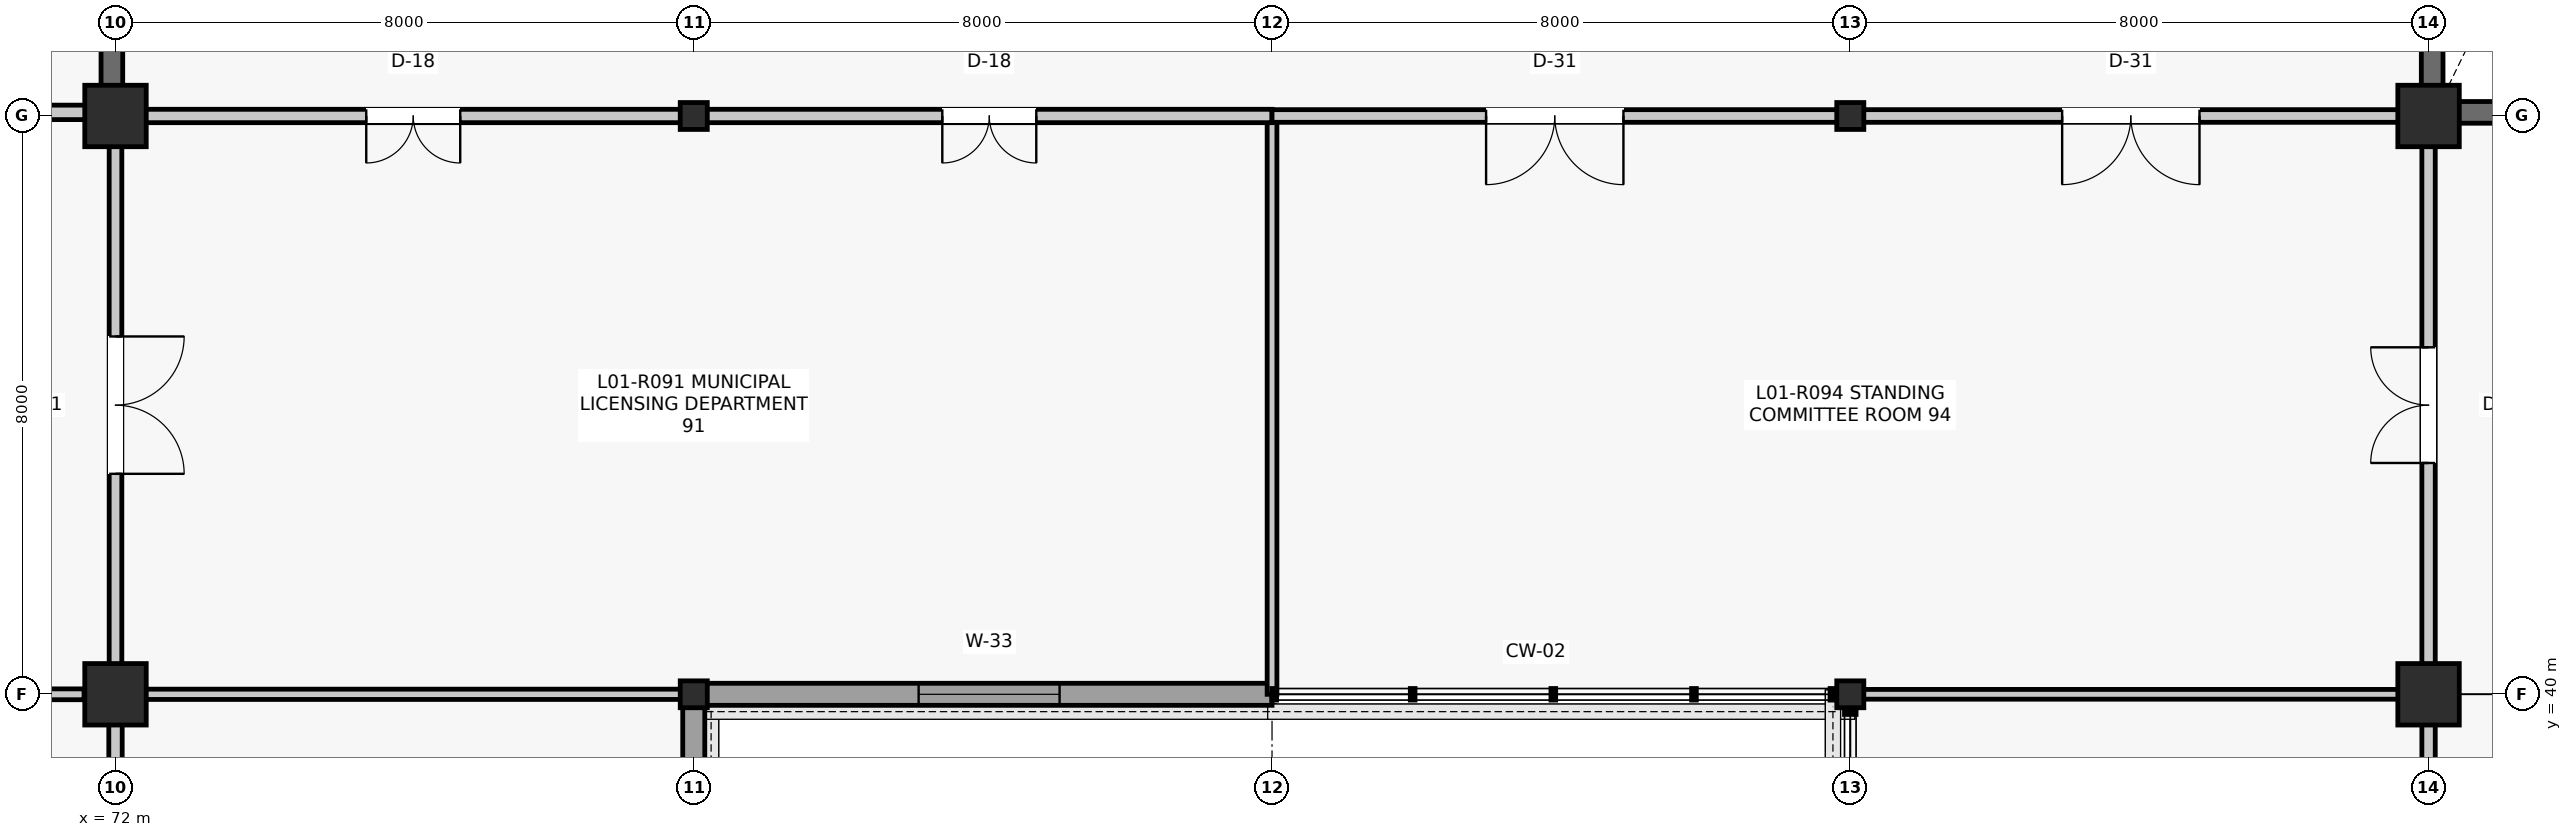
"""IFC4 building model, lengths in metres.
Left out: names, types, materials, properties, quantities, classifications, styles, units other than length and angle.
Written with IfcOpenShell. Run it as: python <this file> out.ifc"""

import sys

from ifc_helpers import new_model, si_unit, direction, frame, frame_2d, origin, origin_2d, place, context, subcontext, project, spatial, rectangle, i_section, extrude, element, fill, save


model = new_model("IFC4")
c1 = context("Model", 3, precision=1e-05, world=origin(), true_north=direction((0.0, 1.0)))
c2 = subcontext(c1, "Body", "Model", "MODEL_VIEW")
j1 = project(units=[si_unit("LENGTHUNIT", "METRE"), si_unit("PLANEANGLEUNIT", "RADIAN")], contexts=[c1])
p1 = place(None, origin())
s1 = spatial("IfcSite", under=j1, at=p1, CompositionType="ELEMENT")
p2 = place(p1, origin())
s2 = spatial("IfcBuilding", under=s1, at=p2, CompositionType="ELEMENT")
p3 = place(p2, frame((0.0, 0.0, 5.28)))
s3 = spatial("IfcBuildingStorey", under=s2, at=p3, CompositionType="ELEMENT", Elevation=5.28)
for number, where, z_axis, x_axis in (
    (1, (72.0, 40.0, 0.0), (0.0, 0.0, 1.0), (1.0, 0.0, 0.0)),
    (2, (72.0, 48.0, 0.0), (0.0, 0.0, 1.0), (1.0, 0.0, 0.0)),
):
    element("IfcColumn", number, at=place(p3, frame(where, z_axis=z_axis, x_axis=x_axis)), inside=s3, PredefinedType="COLUMN", context=c2, shape_type="SweptSolid", body=[
        extrude(rectangle(XDim=0.85, YDim=0.85, at=origin_2d()), origin(), (0.0, 0.0, 1.0), 4.62),
    ])
for number, where, z_axis, x_axis in (
    (3, (80.0, 40.0, 0.0), (0.0, 0.0, 1.0), (1.0, 0.0, 0.0)),
    (4, (80.0, 48.0, 0.0), (0.0, 0.0, 1.0), (1.0, 0.0, 0.0)),
    (5, (96.0, 40.0, 0.0), (0.0, 0.0, 1.0), (1.0, 0.0, 0.0)),
    (6, (96.0, 48.0, 0.0), (0.0, 0.0, 1.0), (1.0, 0.0, 0.0)),
):
    element("IfcColumn", number, at=place(p3, frame(where, z_axis=z_axis, x_axis=x_axis)), inside=s3, PredefinedType="COLUMN", context=c2, shape_type="SweptSolid", body=[
        extrude(i_section(OverallWidth=0.374, OverallDepth=0.372, WebThickness=0.016, FlangeThickness=0.026, FilletRadius=0.015, at=origin_2d()), origin(), (0.0, 0.0, 1.0), 4.62),
    ])
for number, where, z_axis, x_axis in (
    (7, (104.0, 40.0, 0.0), (0.0, 0.0, 1.0), (1.0, 0.0, 0.0)),
    (8, (104.0, 48.0, 0.0), (0.0, 0.0, 1.0), (1.0, 0.0, 0.0)),
):
    element("IfcColumn", number, at=place(p3, frame(where, z_axis=z_axis, x_axis=x_axis)), inside=s3, PredefinedType="COLUMN", context=c2, shape_type="SweptSolid", body=[
        extrude(rectangle(XDim=0.85, YDim=0.85, at=origin_2d()), origin(), (0.0, 0.0, 1.0), 4.62),
    ])
p4 = place(p3, frame((80.0, 32.171, 0.0), z_axis=(0.0, 0.0, 1.0), x_axis=(0.0, 1.0, 0.0)))
e9 = element("IfcWall", 9, at=p4, inside=s3, PredefinedType="SOLIDWALL", context=c2, shape_type="SweptSolid", body=[
    extrude(rectangle(XDim=7.658, YDim=0.305, at=frame_2d((3.829, 0.0))), origin(), (0.0, 0.0, 1.0), 3.788),
])
p5 = place(p4, frame((2.779, 0.0, 0.9)))
e10 = element("IfcOpeningElement", 10, at=p5, cuts=e9, PredefinedType="OPENING", context=c2, shape_type="SweptSolid", body=[
    extrude(rectangle(XDim=2.1, YDim=2.4, at=frame_2d((1.05, 1.2))), frame((0.0, 0.162, 0.0), z_axis=(0.0, -1.0, 0.0), x_axis=(1.0, 0.0, 0.0)), (0.0, 0.0, 1.0), 0.325),
])
p6 = place(p3, frame((80.172, 40.0, 0.0), z_axis=(0.0, 0.0, 1.0), x_axis=(1.0, 0.0, 0.0)))
e11 = element("IfcWall", 11, at=p6, inside=s3, PredefinedType="SOLIDWALL", context=c2, shape_type="SweptSolid", body=[
    extrude(rectangle(XDim=7.828, YDim=0.305, at=frame_2d((3.914, 0.0))), origin(), (0.0, 0.0, 1.0), 3.404),
])
p7 = place(p6, frame((2.939, 0.0, 0.9)))
e12 = element("IfcOpeningElement", 12, at=p7, cuts=e11, PredefinedType="OPENING", context=c2, shape_type="SweptSolid", body=[
    extrude(rectangle(XDim=1.95, YDim=2.304, at=frame_2d((0.975, 1.152))), frame((0.0, 0.162, 0.0), z_axis=(0.0, -1.0, 0.0), x_axis=(1.0, 0.0, 0.0)), (0.0, 0.0, 1.0), 0.325),
])
p8 = place(p3, frame((71.95, 48.315, 0.0), z_axis=(0.0, 0.0, 1.0), x_axis=(0.0, 1.0, 0.0)))
e13 = element("IfcWall", 13, at=p8, inside=s3, PredefinedType="SHEAR", context=c2, shape_type="SweptSolid", body=[
    extrude(rectangle(XDim=7.37, YDim=0.3, at=frame_2d((3.685, 0.0))), origin(), (0.0, 0.0, 1.0), 4.335),
])
p9 = place(p3, frame((68.0, 48.05, 0.0), z_axis=(0.0, 0.0, 1.0), x_axis=(1.0, 0.0, 0.0)))
e14 = element("IfcWall", 14, at=p9, inside=s3, PredefinedType="PARTITIONING", context=c2, shape_type="SweptSolid", body=[
    extrude(rectangle(XDim=3.585, YDim=0.2, at=frame_2d((1.792, 0.0))), origin(), (0.0, 0.0, 1.0), 3.771),
])
p10 = place(p9, frame((1.192, 0.0, 0.0)))
e15 = element("IfcOpeningElement", 15, at=p10, cuts=e14, PredefinedType="OPENING", context=c2, shape_type="SweptSolid", body=[
    extrude(rectangle(XDim=1.2, YDim=2.15, at=frame_2d((0.6, 1.075))), frame((0.0, 0.11, 0.0), z_axis=(0.0, -1.0, 0.0), x_axis=(1.0, 0.0, 0.0)), (0.0, 0.0, 1.0), 0.22),
])
p11 = place(p3, frame((104.05, 48.315, 0.0), z_axis=(0.0, 0.0, 1.0), x_axis=(0.0, 1.0, 0.0)))
e16 = element("IfcWall", 16, at=p11, inside=s3, PredefinedType="SHEAR", context=c2, shape_type="SweptSolid", body=[
    extrude(rectangle(XDim=7.37, YDim=0.3, at=frame_2d((3.685, 0.0))), origin(), (0.0, 0.0, 1.0), 4.335),
])
p12 = place(p3, frame((104.315, 48.05, 0.0), z_axis=(0.0, 0.0, 1.0), x_axis=(1.0, 0.0, 0.0)))
e17 = element("IfcWall", 17, at=p12, inside=s3, PredefinedType="SHEAR", context=c2, shape_type="SweptSolid", body=[
    extrude(rectangle(XDim=3.835, YDim=0.3, at=frame_2d((1.917, 0.0))), origin(), (0.0, 0.0, 1.0), 4.335),
])
p13 = place(p3, frame((66.75, 40.0, 0.0), z_axis=(0.0, 0.0, 1.0), x_axis=(1.0, 0.0, 0.0)))
e18 = element("IfcWall", 18, at=p13, inside=s3, PredefinedType="PARTITIONING", context=c2, shape_type="SweptSolid", body=[
    extrude(rectangle(XDim=4.815, YDim=0.15, at=frame_2d((2.407, 0.0))), origin(), (0.0, 0.0, 1.0), 3.787),
])
p14 = place(p3, frame((72.0, 32.415, 0.0), z_axis=(0.0, 0.0, 1.0), x_axis=(0.0, 1.0, 0.0)))
e19 = element("IfcWall", 19, at=p14, inside=s3, PredefinedType="PARTITIONING", context=c2, shape_type="SweptSolid", body=[
    extrude(rectangle(XDim=7.17, YDim=0.185, at=frame_2d((3.585, 0.0))), origin(), (0.0, 0.0, 1.0), 3.857),
])
p15 = place(p14, frame((0.52, 0.0, 0.0)))
e20 = element("IfcOpeningElement", 20, at=p15, cuts=e19, PredefinedType="OPENING", context=c2, shape_type="SweptSolid", body=[
    extrude(rectangle(XDim=0.94, YDim=2.12, at=frame_2d((0.47, 1.06))), frame((0.0, 0.103, 0.0), z_axis=(0.0, -1.0, 0.0), x_axis=(1.0, 0.0, 0.0)), (0.0, 0.0, 1.0), 0.205),
])
p16 = place(p3, frame((72.0, 40.415, 0.0), z_axis=(0.0, 0.0, 1.0), x_axis=(0.0, 1.0, 0.0)))
e21 = element("IfcWall", 21, at=p16, inside=s3, PredefinedType="PARTITIONING", context=c2, shape_type="SweptSolid", body=[
    extrude(rectangle(XDim=7.17, YDim=0.175, at=frame_2d((3.585, 0.0))), origin(), (0.0, 0.0, 1.0), 3.781),
])
p17 = place(p16, frame((2.635, 0.0, 0.0)))
e22 = element("IfcOpeningElement", 22, at=p17, cuts=e21, PredefinedType="OPENING", context=c2, shape_type="SweptSolid", body=[
    extrude(rectangle(XDim=1.9, YDim=2.38, at=frame_2d((0.95, 1.19))), frame((0.0, 0.097, 0.0), z_axis=(0.0, -1.0, 0.0), x_axis=(1.0, 0.0, 0.0)), (0.0, 0.0, 1.0), 0.195),
])
p18 = place(p3, frame((72.415, 40.0, 0.0), z_axis=(0.0, 0.0, 1.0), x_axis=(1.0, 0.0, 0.0)))
e23 = element("IfcWall", 23, at=p18, inside=s3, PredefinedType="PARTITIONING", context=c2, shape_type="SweptSolid", body=[
    extrude(rectangle(XDim=7.408, YDim=0.142, at=frame_2d((3.704, 0.0))), origin(), (0.0, 0.0, 1.0), 3.771),
])
p19 = place(p3, frame((72.415, 48.0, 0.0), z_axis=(0.0, 0.0, 1.0), x_axis=(1.0, 0.0, 0.0)))
e24 = element("IfcWall", 24, at=p19, inside=s3, PredefinedType="PARTITIONING", context=c2, shape_type="SweptSolid", body=[
    extrude(rectangle(XDim=7.408, YDim=0.185, at=frame_2d((3.704, 0.0))), origin(), (0.0, 0.0, 1.0), 3.781),
])
p20 = place(p19, frame((3.054, 0.0, 0.0)))
e25 = element("IfcOpeningElement", 25, at=p20, cuts=e24, PredefinedType="OPENING", context=c2, shape_type="SweptSolid", body=[
    extrude(rectangle(XDim=1.3, YDim=2.2, at=frame_2d((0.65, 1.1))), frame((0.0, 0.103, 0.0), z_axis=(0.0, -1.0, 0.0), x_axis=(1.0, 0.0, 0.0)), (0.0, 0.0, 1.0), 0.205),
])
p21 = place(p3, frame((88.0, 40.0, 0.0), z_axis=(0.0, 0.0, 1.0), x_axis=(0.0, 1.0, 0.0)))
e26 = element("IfcWall", 26, at=p21, inside=s3, PredefinedType="PARTITIONING", context=c2, shape_type="SweptSolid", body=[
    extrude(rectangle(XDim=8.0, YDim=0.135, at=frame_2d((4.0, 0.0))), origin(), (0.0, 0.0, 1.0), 3.397),
])
p22 = place(p3, frame((80.177, 48.0, 0.0), z_axis=(0.0, 0.0, 1.0), x_axis=(1.0, 0.0, 0.0)))
e27 = element("IfcWall", 27, at=p22, inside=s3, PredefinedType="PARTITIONING", context=c2, shape_type="SweptSolid", body=[
    extrude(rectangle(XDim=7.823, YDim=0.185, at=frame_2d((3.912, 0.0))), origin(), (0.0, 0.0, 1.0), 3.469),
])
p23 = place(p22, frame((3.261, 0.0, 0.0)))
e28 = element("IfcOpeningElement", 28, at=p23, cuts=e27, PredefinedType="OPENING", context=c2, shape_type="SweptSolid", body=[
    extrude(rectangle(XDim=1.3, YDim=2.2, at=frame_2d((0.65, 1.1))), frame((0.0, 0.103, 0.0), z_axis=(0.0, -1.0, 0.0), x_axis=(1.0, 0.0, 0.0)), (0.0, 0.0, 1.0), 0.205),
])
p24 = place(p3, frame((88.0, 48.0, 0.0), z_axis=(0.0, 0.0, 1.0), x_axis=(1.0, 0.0, 0.0)))
e29 = element("IfcWall", 29, at=p24, inside=s3, PredefinedType="PARTITIONING", context=c2, shape_type="SweptSolid", body=[
    extrude(rectangle(XDim=7.823, YDim=0.175, at=frame_2d((3.912, 0.0))), origin(), (0.0, 0.0, 1.0), 3.469),
])
p25 = place(p24, frame((2.961, 0.0, 0.0)))
e30 = element("IfcOpeningElement", 30, at=p25, cuts=e29, PredefinedType="OPENING", context=c2, shape_type="SweptSolid", body=[
    extrude(rectangle(XDim=1.9, YDim=2.38, at=frame_2d((0.95, 1.19))), frame((0.0, 0.097, 0.0), z_axis=(0.0, -1.0, 0.0), x_axis=(1.0, 0.0, 0.0)), (0.0, 0.0, 1.0), 0.195),
])
p26 = place(p3, frame((104.0, 32.415, 0.0), z_axis=(0.0, 0.0, 1.0), x_axis=(0.0, 1.0, 0.0)))
e31 = element("IfcWall", 31, at=p26, inside=s3, PredefinedType="PARTITIONING", context=c2, shape_type="SweptSolid", body=[
    extrude(rectangle(XDim=7.17, YDim=0.185, at=frame_2d((3.585, 0.0))), origin(), (0.0, 0.0, 1.0), 3.857),
])
p27 = place(p26, frame((1.302, 0.0, 0.0)))
e32 = element("IfcOpeningElement", 32, at=p27, cuts=e31, PredefinedType="OPENING", context=c2, shape_type="SweptSolid", body=[
    extrude(rectangle(XDim=0.98, YDim=2.15, at=frame_2d((0.49, 1.075))), frame((0.0, 0.103, 0.0), z_axis=(0.0, -1.0, 0.0), x_axis=(1.0, 0.0, 0.0)), (0.0, 0.0, 1.0), 0.205),
])
p28 = place(p26, frame((5.246, 0.0, 0.0)))
e33 = element("IfcOpeningElement", 33, at=p28, cuts=e31, PredefinedType="OPENING", context=c2, shape_type="SweptSolid", body=[
    extrude(rectangle(XDim=0.98, YDim=2.15, at=frame_2d((0.49, 1.075))), frame((0.0, 0.103, 0.0), z_axis=(0.0, -1.0, 0.0), x_axis=(1.0, 0.0, 0.0)), (0.0, 0.0, 1.0), 0.205),
])
p29 = place(p3, frame((96.177, 40.0, 0.0), z_axis=(0.0, 0.0, 1.0), x_axis=(1.0, 0.0, 0.0)))
e34 = element("IfcWall", 34, at=p29, inside=s3, PredefinedType="PARTITIONING", context=c2, shape_type="SweptSolid", body=[
    extrude(rectangle(XDim=7.408, YDim=0.135, at=frame_2d((3.704, 0.0))), origin(), (0.0, 0.0, 1.0), 3.787),
])
p30 = place(p3, frame((104.0, 40.415, 0.0), z_axis=(0.0, 0.0, 1.0), x_axis=(0.0, 1.0, 0.0)))
e35 = element("IfcWall", 35, at=p30, inside=s3, PredefinedType="PARTITIONING", context=c2, shape_type="SweptSolid", body=[
    extrude(rectangle(XDim=7.17, YDim=0.185, at=frame_2d((3.585, 0.0))), origin(), (0.0, 0.0, 1.0), 3.781),
])
p31 = place(p30, frame((2.785, 0.0, 0.0)))
e36 = element("IfcOpeningElement", 36, at=p31, cuts=e35, PredefinedType="OPENING", context=c2, shape_type="SweptSolid", body=[
    extrude(rectangle(XDim=1.6, YDim=2.25, at=frame_2d((0.8, 1.125))), frame((0.0, 0.103, 0.0), z_axis=(0.0, -1.0, 0.0), x_axis=(1.0, 0.0, 0.0)), (0.0, 0.0, 1.0), 0.205),
])
p32 = place(p3, frame((96.177, 48.0, 0.0), z_axis=(0.0, 0.0, 1.0), x_axis=(1.0, 0.0, 0.0)))
e37 = element("IfcWall", 37, at=p32, inside=s3, PredefinedType="PARTITIONING", context=c2, shape_type="SweptSolid", body=[
    extrude(rectangle(XDim=7.408, YDim=0.175, at=frame_2d((3.704, 0.0))), origin(), (0.0, 0.0, 1.0), 3.771),
])
p33 = place(p32, frame((2.754, 0.0, 0.0)))
e38 = element("IfcOpeningElement", 38, at=p33, cuts=e37, PredefinedType="OPENING", context=c2, shape_type="SweptSolid", body=[
    extrude(rectangle(XDim=1.9, YDim=2.38, at=frame_2d((0.95, 1.19))), frame((0.0, 0.097, 0.0), z_axis=(0.0, -1.0, 0.0), x_axis=(1.0, 0.0, 0.0)), (0.0, 0.0, 1.0), 0.195),
])
p34 = place(p7, origin())
e39 = element("IfcWindow", 39, at=p34, inside=s3, PartitioningType="SINGLE_PANEL", PredefinedType="WINDOW", context=c2, shape_type="SweptSolid", body=[
    extrude(rectangle(XDim=1.95, YDim=2.304, at=frame_2d((0.975, 1.152))), frame((0.0, 0.03, 0.0), z_axis=(0.0, -1.0, 0.0), x_axis=(1.0, 0.0, 0.0)), (0.0, 0.0, 1.0), 0.06),
])
fill(e12, e39)
p35 = place(p17, frame((1.9, 0.0, 0.0), z_axis=(0.0, 0.0, 1.0), x_axis=(-1.0, 0.0, 0.0)))
e40 = element("IfcDoor", 40, at=p35, inside=s3, OperationType="DOUBLE_DOOR_SINGLE_SWING", PredefinedType="DOOR", context=c2, shape_type="SweptSolid", body=[
    extrude(rectangle(XDim=1.9, YDim=2.38, at=frame_2d((0.95, 1.19))), frame((0.0, 0.025, 0.0), z_axis=(0.0, -1.0, 0.0), x_axis=(1.0, 0.0, 0.0)), (0.0, 0.0, 1.0), 0.05),
])
fill(e22, e40)
p36 = place(p20, frame((1.3, 0.0, 0.0), z_axis=(0.0, 0.0, 1.0), x_axis=(-1.0, 0.0, 0.0)))
e41 = element("IfcDoor", 41, at=p36, inside=s3, OperationType="DOUBLE_DOOR_SINGLE_SWING", PredefinedType="DOOR", context=c2, shape_type="SweptSolid", body=[
    extrude(rectangle(XDim=1.3, YDim=2.2, at=frame_2d((0.65, 1.1))), frame((0.0, 0.025, 0.0), z_axis=(0.0, -1.0, 0.0), x_axis=(1.0, 0.0, 0.0)), (0.0, 0.0, 1.0), 0.05),
])
fill(e25, e41)
p37 = place(p23, frame((1.3, 0.0, 0.0), z_axis=(0.0, 0.0, 1.0), x_axis=(-1.0, 0.0, 0.0)))
e42 = element("IfcDoor", 42, at=p37, inside=s3, OperationType="DOUBLE_DOOR_SINGLE_SWING", PredefinedType="DOOR", context=c2, shape_type="SweptSolid", body=[
    extrude(rectangle(XDim=1.3, YDim=2.2, at=frame_2d((0.65, 1.1))), frame((0.0, 0.025, 0.0), z_axis=(0.0, -1.0, 0.0), x_axis=(1.0, 0.0, 0.0)), (0.0, 0.0, 1.0), 0.05),
])
fill(e28, e42)
p38 = place(p25, frame((1.9, 0.0, 0.0), z_axis=(0.0, 0.0, 1.0), x_axis=(-1.0, 0.0, 0.0)))
e43 = element("IfcDoor", 43, at=p38, inside=s3, OperationType="DOUBLE_DOOR_SINGLE_SWING", PredefinedType="DOOR", context=c2, shape_type="SweptSolid", body=[
    extrude(rectangle(XDim=1.9, YDim=2.38, at=frame_2d((0.95, 1.19))), frame((0.0, 0.025, 0.0), z_axis=(0.0, -1.0, 0.0), x_axis=(1.0, 0.0, 0.0)), (0.0, 0.0, 1.0), 0.05),
])
fill(e30, e43)
p39 = place(p31, origin())
e44 = element("IfcDoor", 44, at=p39, inside=s3, OperationType="DOUBLE_DOOR_SINGLE_SWING", PredefinedType="DOOR", context=c2, shape_type="SweptSolid", body=[
    extrude(rectangle(XDim=1.6, YDim=2.25, at=frame_2d((0.8, 1.125))), frame((0.0, 0.025, 0.0), z_axis=(0.0, -1.0, 0.0), x_axis=(1.0, 0.0, 0.0)), (0.0, 0.0, 1.0), 0.05),
])
fill(e36, e44)
p40 = place(p33, frame((1.9, 0.0, 0.0), z_axis=(0.0, 0.0, 1.0), x_axis=(-1.0, 0.0, 0.0)))
e45 = element("IfcDoor", 45, at=p40, inside=s3, OperationType="DOUBLE_DOOR_SINGLE_SWING", PredefinedType="DOOR", context=c2, shape_type="SweptSolid", body=[
    extrude(rectangle(XDim=1.9, YDim=2.38, at=frame_2d((0.95, 1.19))), frame((0.0, 0.025, 0.0), z_axis=(0.0, -1.0, 0.0), x_axis=(1.0, 0.0, 0.0)), (0.0, 0.0, 1.0), 0.05),
])
fill(e38, e45)
save(model, sys.argv[1])
